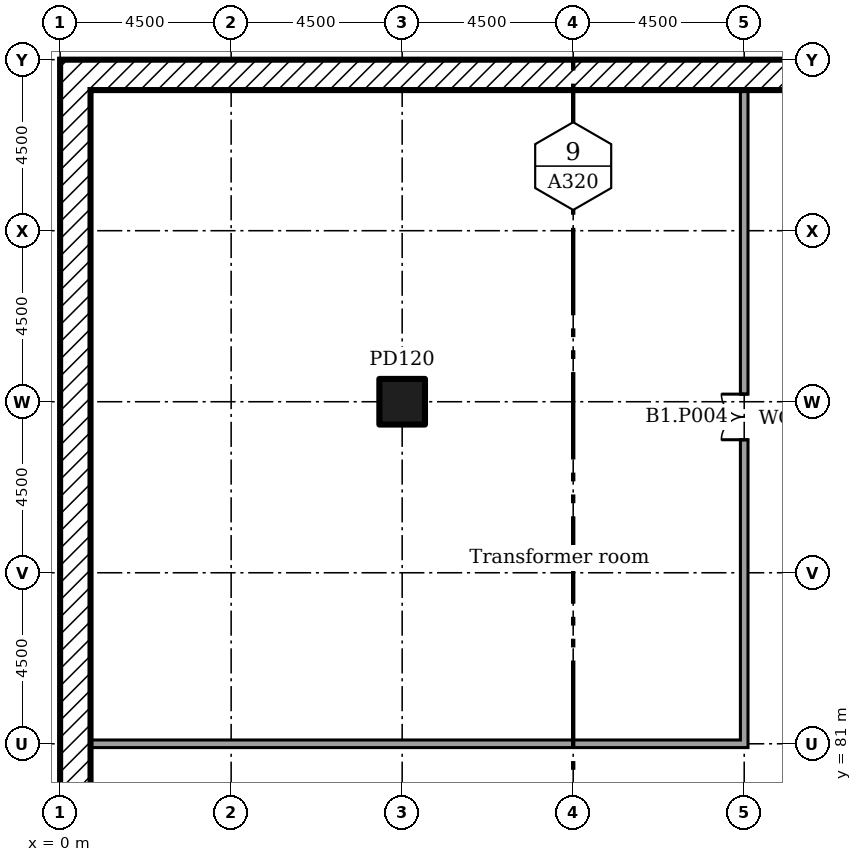
"""IFC4 building model, lengths in metres.
Left out: names, types, materials, properties, quantities, classifications, styles, units other than length and angle.
Written with IfcOpenShell. Run it as: python <this file> out.ifc"""

import sys

from ifc_helpers import new_model, si_unit, direction, frame, frame_2d, origin, origin_2d, place, context, subcontext, project, spatial, rectangle, extrude, element, fill, save


model = new_model("IFC4")
c1 = context("Model", 3, precision=1e-05, world=origin(), true_north=direction((0.0, 1.0)))
c2 = subcontext(c1, "Body", "Model", "MODEL_VIEW")
j1 = project(units=[si_unit("LENGTHUNIT", "METRE"), si_unit("PLANEANGLEUNIT", "RADIAN")], contexts=[c1])
p1 = place(None, origin())
s1 = spatial("IfcSite", under=j1, at=p1, CompositionType="ELEMENT")
p2 = place(p1, origin())
s2 = spatial("IfcBuilding", under=s1, at=p2, CompositionType="ELEMENT")
p3 = place(p2, frame((0.0, 0.0, -4.0)))
s3 = spatial("IfcBuildingStorey", under=s2, at=p3, CompositionType="ELEMENT", Elevation=-4.0)
p4 = place(p3, frame((9.0, 90.0, 0.0)))
e1 = element("IfcColumn", 1, at=p4, inside=s3, PredefinedType="COLUMN", context=c2, shape_type="SweptSolid", body=[
    extrude(rectangle(XDim=1.2, YDim=1.2, at=origin_2d()), origin(), (0.0, 0.0, 1.0), 4.0),
])
p5 = place(p3, frame((0.0, 98.6, 0.0)))
e2 = element("IfcWall", 2, at=p5, inside=s3, PredefinedType="SOLIDWALL", context=c2, shape_type="SweptSolid", body=[
    extrude(rectangle(XDim=153.0, YDim=0.8, at=frame_2d((76.5, 0.0))), origin(), (0.0, 0.0, 1.0), 4.0),
])
p6 = place(p3, frame((0.4, 0.8, 0.0), z_axis=(0.0, 0.0, 1.0), x_axis=(0.0, 1.0, 0.0)))
e3 = element("IfcWall", 3, at=p6, inside=s3, PredefinedType="SOLIDWALL", context=c2, shape_type="SweptSolid", body=[
    extrude(rectangle(XDim=97.4, YDim=0.8, at=frame_2d((48.7, 0.0))), origin(), (0.0, 0.0, 1.0), 4.0),
])
p7 = place(p3, frame((18.0, 80.9, 0.0), z_axis=(0.0, 0.0, 1.0), x_axis=(0.0, 1.0, 0.0)))
e4 = element("IfcWall", 4, at=p7, inside=s3, PredefinedType="SOLIDWALL", context=c2, shape_type="SweptSolid", body=[
    extrude(rectangle(XDim=17.3, YDim=0.2, at=frame_2d((8.65, 0.0))), origin(), (0.0, 0.0, 1.0), 3.55),
])
p8 = place(p7, frame((8.1, 0.0, 0.0)))
e5 = element("IfcOpeningElement", 5, at=p8, cuts=e4, PredefinedType="OPENING", context=c2, shape_type="SweptSolid", body=[
    extrude(rectangle(XDim=1.2, YDim=2.1, at=frame_2d((0.6, 1.05))), frame((0.0, 0.11, 0.0), z_axis=(0.0, -1.0, 0.0), x_axis=(1.0, 0.0, 0.0)), (0.0, 0.0, 1.0), 0.22),
])
p9 = place(p3, frame((0.8, 81.0, 0.0)))
e6 = element("IfcWall", 6, at=p9, inside=s3, PredefinedType="SOLIDWALL", context=c2, shape_type="SweptSolid", body=[
    extrude(rectangle(XDim=17.1, YDim=0.2, at=frame_2d((8.55, 0.0))), origin(), (0.0, 0.0, 1.0), 3.55),
])
p10 = place(p8, origin())
e7 = element("IfcDoor", 7, at=p10, inside=s3, OperationType="DOUBLE_DOOR_SINGLE_SWING", PredefinedType="DOOR", context=c2, shape_type="SweptSolid", body=[
    extrude(rectangle(XDim=1.2, YDim=2.1, at=frame_2d((0.6, 1.05))), frame((0.0, 0.025, 0.0), z_axis=(0.0, -1.0, 0.0), x_axis=(1.0, 0.0, 0.0)), (0.0, 0.0, 1.0), 0.05),
])
fill(e5, e7)
save(model, sys.argv[1])
